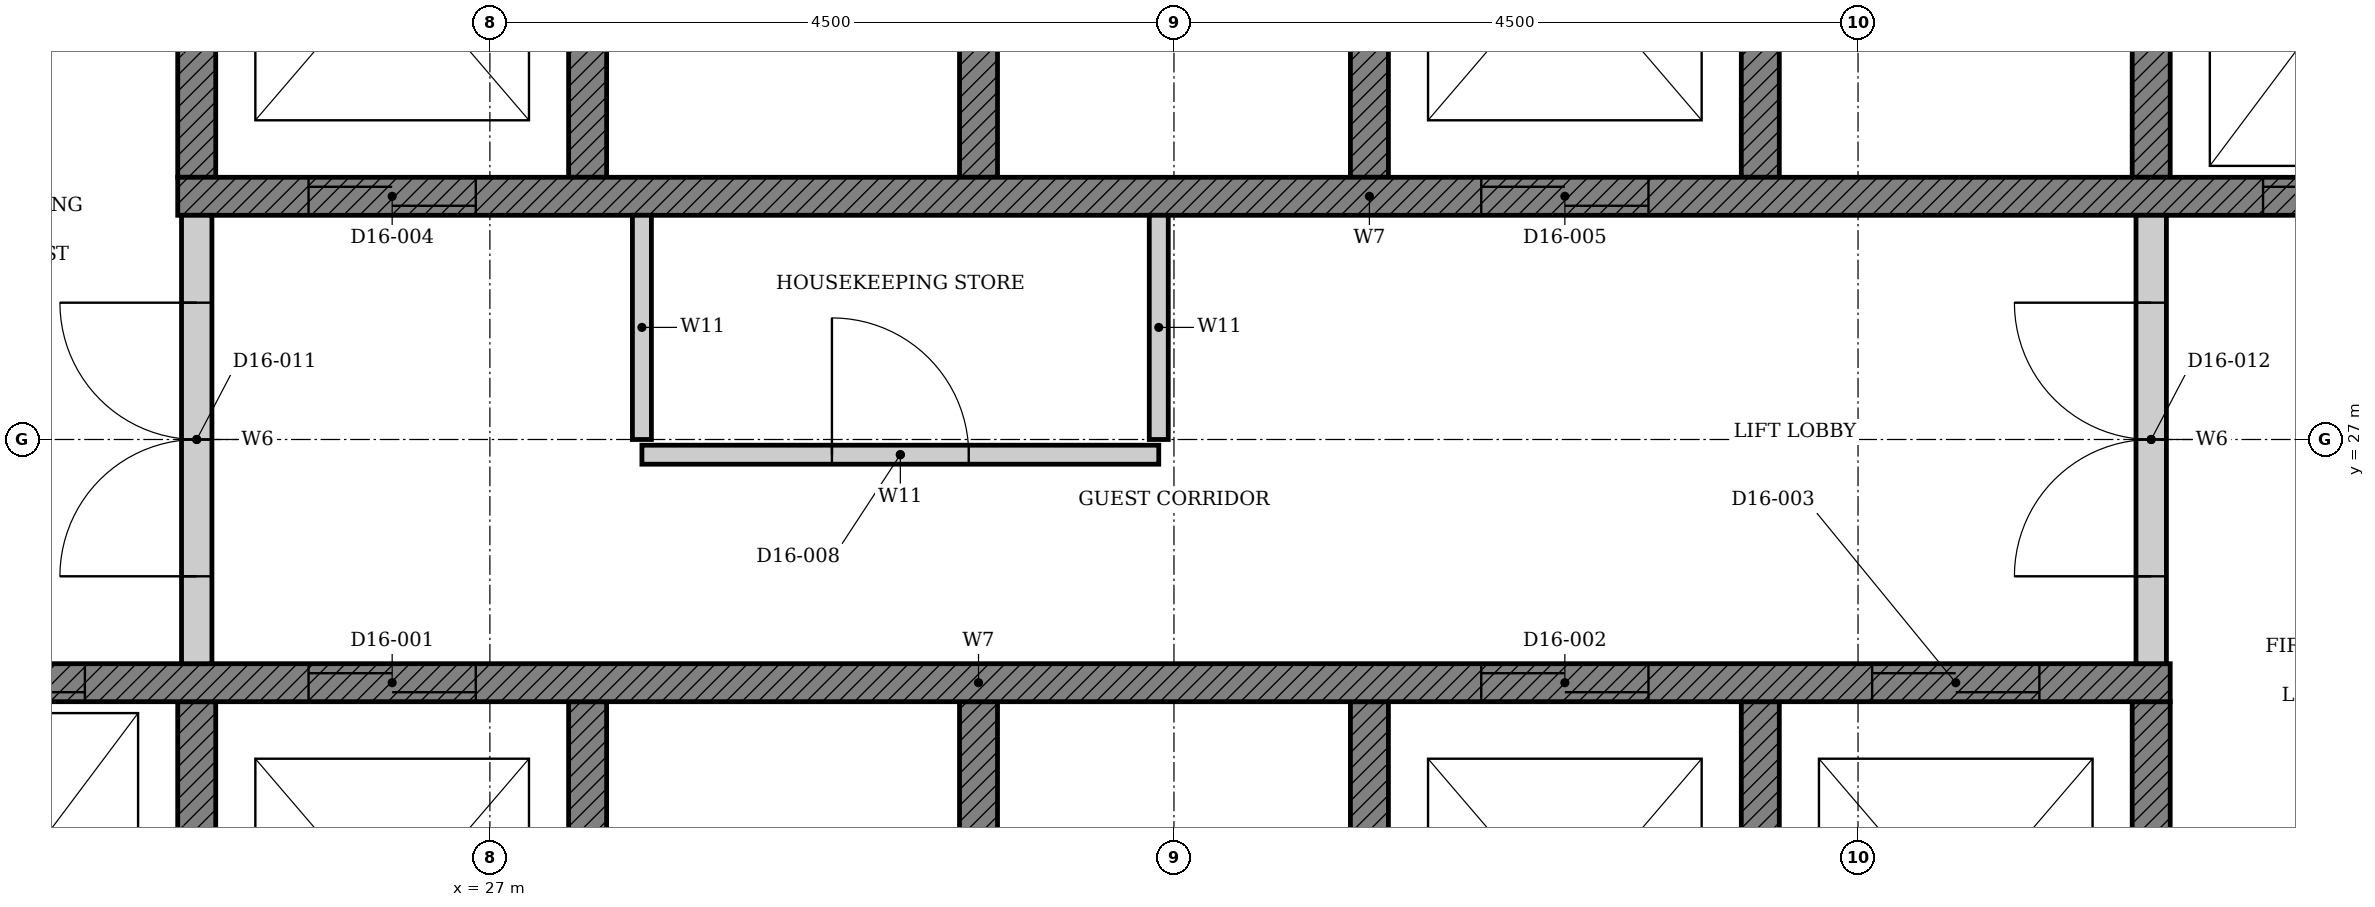
"""IFC4 building model, lengths in metres.
Left out: names, types, materials, properties, quantities, classifications, styles, units other than length and angle.
Written with IfcOpenShell. Run it as: python <this file> out.ifc"""

import sys

from ifc_helpers import new_model, si_unit, direction, frame, frame_2d, origin, place, context, subcontext, project, spatial, polyline, rectangle, outline, extrude, element, fill, save


model = new_model("IFC4")
c1 = context("Model", 3, precision=1e-05, world=origin(), true_north=direction((0.0, 1.0)))
c2 = subcontext(c1, "Body", "Model", "MODEL_VIEW")
j1 = project(units=[si_unit("LENGTHUNIT", "METRE"), si_unit("PLANEANGLEUNIT", "RADIAN")], contexts=[c1])
p1 = place(None, origin())
s1 = spatial("IfcSite", under=j1, at=p1, CompositionType="ELEMENT")
p2 = place(p1, origin())
s2 = spatial("IfcBuilding", under=s1, at=p2, CompositionType="ELEMENT")
p3 = place(p2, frame((0.0, 0.0, 70.8)))
s3 = spatial("IfcBuildingStorey", under=s2, at=p3, CompositionType="ELEMENT", Elevation=70.8)
p4 = place(p3, origin())
e1 = element("IfcWall", 1, at=p4, inside=s3, PredefinedType="SHEAR", context=c2, shape_type="SweptSolid", body=[
    extrude(outline(polyline([(22.375, 22.35), (38.053, 22.35), (38.053, 25.275), (37.803, 25.275), (37.803, 22.65), (35.482, 22.65), (35.482, 25.275), (35.232, 25.275), (35.232, 22.65), (32.911, 22.65), (32.911, 25.275), (32.661, 25.275), (32.661, 22.65), (30.339, 22.65), (30.339, 25.275), (30.089, 25.275), (30.089, 22.65), (27.768, 22.65), (27.768, 25.275), (27.518, 25.275), (27.518, 22.65), (25.197, 22.65), (25.197, 25.275), (24.947, 25.275), (24.947, 22.65), (22.625, 22.65), (22.625, 25.275), (22.375, 25.275), (22.375, 22.35)])), origin(), (0.0, 0.0, 1.0), 3.3),
])
p5 = place(p3, origin())
e2 = element("IfcWall", 2, at=p5, inside=s3, PredefinedType="SHEAR", context=c2, shape_type="SweptSolid", body=[
    extrude(outline(polyline([(24.947, 28.725), (25.197, 28.725), (25.197, 31.35), (27.518, 31.35), (27.518, 28.725), (27.768, 28.725), (27.768, 31.35), (30.089, 31.35), (30.089, 28.725), (30.339, 28.725), (30.339, 31.35), (32.661, 31.35), (32.661, 28.725), (32.911, 28.725), (32.911, 31.35), (35.232, 31.35), (35.232, 28.725), (35.482, 28.725), (35.482, 31.35), (37.803, 31.35), (37.803, 28.725), (38.053, 28.725), (38.053, 31.35), (40.375, 31.35), (40.375, 28.725), (40.625, 28.725), (40.625, 31.65), (24.947, 31.65), (24.947, 28.725)])), origin(), (0.0, 0.0, 1.0), 3.3),
])
p6 = place(p3, frame((22.375, 25.4, 0.0), z_axis=(0.0, 0.0, 1.0), x_axis=(1.0, 0.0, 0.0)))
e3 = element("IfcWall", 3, at=p6, inside=s3, PredefinedType="SHEAR", context=c2, shape_type="SweptSolid", body=[
    extrude(rectangle(XDim=15.678, YDim=0.25, at=frame_2d((7.839, 0.0))), origin(), (0.0, 0.0, 1.0), 3.3),
])
p7 = place(p6, frame((3.432, 0.0, 0.0)))
e4 = element("IfcOpeningElement", 4, at=p7, cuts=e3, PredefinedType="OPENING", context=c2, shape_type="SweptSolid", body=[
    extrude(rectangle(XDim=1.1, YDim=2.1, at=frame_2d((0.55, 1.05))), frame((0.0, 0.135, 0.0), z_axis=(0.0, -1.0, 0.0), x_axis=(1.0, 0.0, 0.0)), (0.0, 0.0, 1.0), 0.27),
])
p8 = place(p6, frame((11.146, 0.0, 0.0)))
e5 = element("IfcOpeningElement", 5, at=p8, cuts=e3, PredefinedType="OPENING", context=c2, shape_type="SweptSolid", body=[
    extrude(rectangle(XDim=1.1, YDim=2.1, at=frame_2d((0.55, 1.05))), frame((0.0, 0.135, 0.0), z_axis=(0.0, -1.0, 0.0), x_axis=(1.0, 0.0, 0.0)), (0.0, 0.0, 1.0), 0.27),
])
p9 = place(p6, frame((13.718, 0.0, 0.0)))
e6 = element("IfcOpeningElement", 6, at=p9, cuts=e3, PredefinedType="OPENING", context=c2, shape_type="SweptSolid", body=[
    extrude(rectangle(XDim=1.1, YDim=2.1, at=frame_2d((0.55, 1.05))), frame((0.0, 0.135, 0.0), z_axis=(0.0, -1.0, 0.0), x_axis=(1.0, 0.0, 0.0)), (0.0, 0.0, 1.0), 0.27),
])
p10 = place(p6, frame((0.861, 0.0, 0.0)))
e7 = element("IfcOpeningElement", 7, at=p10, cuts=e3, PredefinedType="OPENING", context=c2, shape_type="SweptSolid", body=[
    extrude(rectangle(XDim=1.1, YDim=2.1, at=frame_2d((0.55, 1.05))), frame((0.0, 0.135, 0.0), z_axis=(0.0, -1.0, 0.0), x_axis=(1.0, 0.0, 0.0)), (0.0, 0.0, 1.0), 0.27),
])
p11 = place(p3, frame((24.947, 28.6, 0.0), z_axis=(0.0, 0.0, 1.0), x_axis=(1.0, 0.0, 0.0)))
e8 = element("IfcWall", 8, at=p11, inside=s3, PredefinedType="SHEAR", context=c2, shape_type="SweptSolid", body=[
    extrude(rectangle(XDim=15.678, YDim=0.25, at=frame_2d((7.839, 0.0))), origin(), (0.0, 0.0, 1.0), 3.3),
])
p12 = place(p11, frame((0.861, 0.0, 0.0)))
e9 = element("IfcOpeningElement", 9, at=p12, cuts=e8, PredefinedType="OPENING", context=c2, shape_type="SweptSolid", body=[
    extrude(rectangle(XDim=1.1, YDim=2.1, at=frame_2d((0.55, 1.05))), frame((0.0, 0.135, 0.0), z_axis=(0.0, -1.0, 0.0), x_axis=(1.0, 0.0, 0.0)), (0.0, 0.0, 1.0), 0.27),
])
p13 = place(p11, frame((8.575, 0.0, 0.0)))
e10 = element("IfcOpeningElement", 10, at=p13, cuts=e8, PredefinedType="OPENING", context=c2, shape_type="SweptSolid", body=[
    extrude(rectangle(XDim=1.1, YDim=2.1, at=frame_2d((0.55, 1.05))), frame((0.0, 0.135, 0.0), z_axis=(0.0, -1.0, 0.0), x_axis=(1.0, 0.0, 0.0)), (0.0, 0.0, 1.0), 0.27),
])
p14 = place(p11, frame((13.718, 0.0, 0.0)))
e11 = element("IfcOpeningElement", 11, at=p14, cuts=e8, PredefinedType="OPENING", context=c2, shape_type="SweptSolid", body=[
    extrude(rectangle(XDim=1.1, YDim=2.1, at=frame_2d((0.55, 1.05))), frame((0.0, 0.135, 0.0), z_axis=(0.0, -1.0, 0.0), x_axis=(1.0, 0.0, 0.0)), (0.0, 0.0, 1.0), 0.27),
])
p15 = place(p3, frame((28.0, 26.9, 0.0), z_axis=(0.0, 0.0, 1.0), x_axis=(1.0, 0.0, 0.0)))
e12 = element("IfcWall", 12, at=p15, inside=s3, PredefinedType="PARTITIONING", context=c2, shape_type="SweptSolid", body=[
    extrude(rectangle(XDim=3.4, YDim=0.125, at=frame_2d((1.7, 0.0))), origin(), (0.0, 0.0, 1.0), 3.3),
])
p16 = place(p15, frame((1.25, 0.0, 0.0)))
e13 = element("IfcOpeningElement", 13, at=p16, cuts=e12, PredefinedType="OPENING", context=c2, shape_type="SweptSolid", body=[
    extrude(rectangle(XDim=0.9, YDim=2.1, at=frame_2d((0.45, 1.05))), frame((0.0, 0.073, 0.0), z_axis=(0.0, -1.0, 0.0), x_axis=(1.0, 0.0, 0.0)), (0.0, 0.0, 1.0), 0.145),
])
for number, where, z_axis, x_axis in (
    (14, (28.0, 28.475, 0.0), (0.0, 0.0, 1.0), (0.0, -1.0, 0.0)),
    (15, (31.4, 28.475, 0.0), (0.0, 0.0, 1.0), (0.0, -1.0, 0.0)),
):
    element("IfcWall", number, at=place(p3, frame(where, z_axis=z_axis, x_axis=x_axis)), inside=s3, PredefinedType="PARTITIONING", context=c2, shape_type="SweptSolid", body=[
        extrude(rectangle(XDim=1.475, YDim=0.125, at=frame_2d((0.738, 0.0))), origin(), (0.0, 0.0, 1.0), 3.3),
    ])
p17 = place(p3, frame((25.072, 25.525, 0.0), z_axis=(0.0, 0.0, 1.0), x_axis=(0.0, 1.0, 0.0)))
e16 = element("IfcWall", 16, at=p17, inside=s3, PredefinedType="PARTITIONING", context=c2, shape_type="SweptSolid", body=[
    extrude(rectangle(XDim=2.95, YDim=0.2, at=frame_2d((1.475, 0.0))), origin(), (0.0, 0.0, 1.0), 3.3),
])
p18 = place(p17, frame((0.575, 0.0, 0.0)))
e17 = element("IfcOpeningElement", 17, at=p18, cuts=e16, PredefinedType="OPENING", context=c2, shape_type="SweptSolid", body=[
    extrude(rectangle(XDim=1.8, YDim=2.1, at=frame_2d((0.9, 1.05))), frame((0.0, 0.11, 0.0), z_axis=(0.0, -1.0, 0.0), x_axis=(1.0, 0.0, 0.0)), (0.0, 0.0, 1.0), 0.22),
])
p19 = place(p3, frame((37.928, 25.525, 0.0), z_axis=(0.0, 0.0, 1.0), x_axis=(0.0, 1.0, 0.0)))
e18 = element("IfcWall", 18, at=p19, inside=s3, PredefinedType="PARTITIONING", context=c2, shape_type="SweptSolid", body=[
    extrude(rectangle(XDim=2.95, YDim=0.2, at=frame_2d((1.475, 0.0))), origin(), (0.0, 0.0, 1.0), 3.3),
])
p20 = place(p19, frame((0.575, 0.0, 0.0)))
e19 = element("IfcOpeningElement", 19, at=p20, cuts=e18, PredefinedType="OPENING", context=c2, shape_type="SweptSolid", body=[
    extrude(rectangle(XDim=1.8, YDim=2.1, at=frame_2d((0.9, 1.05))), frame((0.0, 0.11, 0.0), z_axis=(0.0, -1.0, 0.0), x_axis=(1.0, 0.0, 0.0)), (0.0, 0.0, 1.0), 0.22),
])
p21 = place(p7, origin())
e20 = element("IfcDoor", 20, at=p21, inside=s3, OperationType="DOUBLE_DOOR_SLIDING", PredefinedType="DOOR", context=c2, shape_type="SweptSolid", body=[
    extrude(rectangle(XDim=1.1, YDim=2.1, at=frame_2d((0.55, 1.05))), frame((0.0, 0.025, 0.0), z_axis=(0.0, -1.0, 0.0), x_axis=(1.0, 0.0, 0.0)), (0.0, 0.0, 1.0), 0.05),
])
fill(e4, e20)
p22 = place(p8, origin())
e21 = element("IfcDoor", 21, at=p22, inside=s3, OperationType="DOUBLE_DOOR_SLIDING", PredefinedType="DOOR", context=c2, shape_type="SweptSolid", body=[
    extrude(rectangle(XDim=1.1, YDim=2.1, at=frame_2d((0.55, 1.05))), frame((0.0, 0.025, 0.0), z_axis=(0.0, -1.0, 0.0), x_axis=(1.0, 0.0, 0.0)), (0.0, 0.0, 1.0), 0.05),
])
fill(e5, e21)
p23 = place(p9, origin())
e22 = element("IfcDoor", 22, at=p23, inside=s3, OperationType="DOUBLE_DOOR_SLIDING", PredefinedType="DOOR", context=c2, shape_type="SweptSolid", body=[
    extrude(rectangle(XDim=1.1, YDim=2.1, at=frame_2d((0.55, 1.05))), frame((0.0, 0.025, 0.0), z_axis=(0.0, -1.0, 0.0), x_axis=(1.0, 0.0, 0.0)), (0.0, 0.0, 1.0), 0.05),
])
fill(e6, e22)
p24 = place(p12, origin())
e23 = element("IfcDoor", 23, at=p24, inside=s3, OperationType="DOUBLE_DOOR_SLIDING", PredefinedType="DOOR", context=c2, shape_type="SweptSolid", body=[
    extrude(rectangle(XDim=1.1, YDim=2.1, at=frame_2d((0.55, 1.05))), frame((0.0, 0.025, 0.0), z_axis=(0.0, -1.0, 0.0), x_axis=(1.0, 0.0, 0.0)), (0.0, 0.0, 1.0), 0.05),
])
fill(e9, e23)
p25 = place(p13, origin())
e24 = element("IfcDoor", 24, at=p25, inside=s3, OperationType="DOUBLE_DOOR_SLIDING", PredefinedType="DOOR", context=c2, shape_type="SweptSolid", body=[
    extrude(rectangle(XDim=1.1, YDim=2.1, at=frame_2d((0.55, 1.05))), frame((0.0, 0.025, 0.0), z_axis=(0.0, -1.0, 0.0), x_axis=(1.0, 0.0, 0.0)), (0.0, 0.0, 1.0), 0.05),
])
fill(e10, e24)
p26 = place(p10, origin())
e25 = element("IfcDoor", 25, at=p26, inside=s3, OperationType="DOUBLE_DOOR_SLIDING", PredefinedType="DOOR", context=c2, shape_type="SweptSolid", body=[
    extrude(rectangle(XDim=1.1, YDim=2.1, at=frame_2d((0.55, 1.05))), frame((0.0, 0.025, 0.0), z_axis=(0.0, -1.0, 0.0), x_axis=(1.0, 0.0, 0.0)), (0.0, 0.0, 1.0), 0.05),
])
fill(e7, e25)
p27 = place(p14, origin())
e26 = element("IfcDoor", 26, at=p27, inside=s3, OperationType="DOUBLE_DOOR_SLIDING", PredefinedType="DOOR", context=c2, shape_type="SweptSolid", body=[
    extrude(rectangle(XDim=1.1, YDim=2.1, at=frame_2d((0.55, 1.05))), frame((0.0, 0.025, 0.0), z_axis=(0.0, -1.0, 0.0), x_axis=(1.0, 0.0, 0.0)), (0.0, 0.0, 1.0), 0.05),
])
fill(e11, e26)
p28 = place(p16, origin())
e27 = element("IfcDoor", 27, at=p28, inside=s3, OperationType="SINGLE_SWING_LEFT", PredefinedType="DOOR", context=c2, shape_type="SweptSolid", body=[
    extrude(rectangle(XDim=0.9, YDim=2.1, at=frame_2d((0.45, 1.05))), frame((0.0, 0.025, 0.0), z_axis=(0.0, -1.0, 0.0), x_axis=(1.0, 0.0, 0.0)), (0.0, 0.0, 1.0), 0.05),
])
fill(e13, e27)
p29 = place(p18, origin())
e28 = element("IfcDoor", 28, at=p29, inside=s3, OperationType="DOUBLE_DOOR_SINGLE_SWING", PredefinedType="DOOR", context=c2, shape_type="SweptSolid", body=[
    extrude(rectangle(XDim=1.8, YDim=2.1, at=frame_2d((0.9, 1.05))), frame((0.0, 0.025, 0.0), z_axis=(0.0, -1.0, 0.0), x_axis=(1.0, 0.0, 0.0)), (0.0, 0.0, 1.0), 0.05),
])
fill(e17, e28)
p30 = place(p20, origin())
e29 = element("IfcDoor", 29, at=p30, inside=s3, OperationType="DOUBLE_DOOR_SINGLE_SWING", PredefinedType="DOOR", context=c2, shape_type="SweptSolid", body=[
    extrude(rectangle(XDim=1.8, YDim=2.1, at=frame_2d((0.9, 1.05))), frame((0.0, 0.025, 0.0), z_axis=(0.0, -1.0, 0.0), x_axis=(1.0, 0.0, 0.0)), (0.0, 0.0, 1.0), 0.05),
])
fill(e19, e29)
save(model, sys.argv[1])
